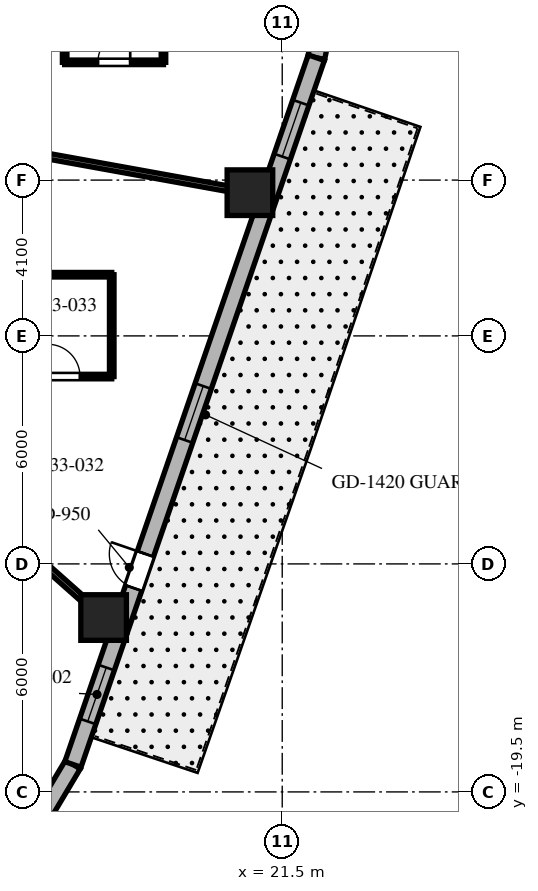
"""IFC4 building model, lengths in metres.
Left out: names, types, materials, properties, quantities, classifications, styles, units other than length and angle.
Written with IfcOpenShell. Run it as: python <this file> out.ifc"""

import sys

from ifc_helpers import new_model, si_unit, direction, frame, frame_2d, origin, origin_2d, place, context, subcontext, project, spatial, rectangle, extrude, element, fill, save


model = new_model("IFC4")
c1 = context("Model", 3, precision=1e-05, world=origin(), true_north=direction((0.0, 1.0)))
c2 = subcontext(c1, "Body", "Model", "MODEL_VIEW")
j1 = project(units=[si_unit("LENGTHUNIT", "METRE"), si_unit("PLANEANGLEUNIT", "RADIAN")], contexts=[c1])
p1 = place(None, origin())
s1 = spatial("IfcSite", under=j1, at=p1, CompositionType="ELEMENT")
p2 = place(p1, origin())
s2 = spatial("IfcBuilding", under=s1, at=p2, CompositionType="ELEMENT")
p3 = place(p2, frame((0.0, 0.0, 135.8)))
s3 = spatial("IfcBuildingStorey", under=s2, at=p3, CompositionType="ELEMENT", Elevation=135.8)
for number, where, z_axis, x_axis in (
    (1, (16.8, -14.911, 0.0), (0.0, 0.0, 1.0), (1.0, 0.0, 0.0)),
    (2, (20.65, -3.731, 0.0), (0.0, 0.0, 1.0), (1.0, 0.0, 0.0)),
):
    element("IfcColumn", number, at=place(p3, frame(where, z_axis=z_axis, x_axis=x_axis)), inside=s3, PredefinedType="COLUMN", context=c2, shape_type="SweptSolid", body=[
        extrude(rectangle(XDim=1.2, YDim=1.2, at=origin_2d()), origin(), (0.0, 0.0, 1.0), 3.7),
    ])
p4 = place(p3, frame((15.272, -19.984, 0.0), z_axis=(0.0, 0.0, 1.0), x_axis=(0.512579347361, 0.858639862025, 0.0)))
e3 = element("IfcWall", 3, at=p4, inside=s3, PredefinedType="SOLIDWALL", context=c2, shape_type="SweptSolid", body=[
    extrude(rectangle(XDim=1.406, YDim=0.45, at=frame_2d((0.703, 0.0))), origin(), (0.0, 0.0, 1.0), 3.38),
])
p5 = place(p3, frame((22.397, -0.179, 0.0), z_axis=(0.0, 0.0, 1.0), x_axis=(0.199313589404, 0.979935759669, 0.0)))
e4 = element("IfcWall", 4, at=p5, inside=s3, PredefinedType="SOLIDWALL", context=c2, shape_type="SweptSolid", body=[
    extrude(rectangle(XDim=0.896, YDim=0.45, at=frame_2d((0.448, 0.0))), origin(), (0.0, 0.0, 1.0), 3.38),
])
p6 = place(p3, frame((15.992, -18.777, 0.0), z_axis=(0.0, 0.0, 1.0), x_axis=(0.325606988926, 0.945505202927, 0.0)))
e5 = element("IfcWall", 5, at=p6, inside=s3, PredefinedType="SOLIDWALL", context=c2, shape_type="SweptSolid", body=[
    extrude(rectangle(XDim=19.669, YDim=0.45, at=frame_2d((9.835, 0.0))), origin(), (0.0, 0.0, 1.0), 3.38),
])
p7 = place(p6, frame((4.909, 0.0, 0.0)))
e6 = element("IfcOpeningElement", 6, at=p7, cuts=e5, PredefinedType="OPENING", context=c2, shape_type="SweptSolid", body=[
    extrude(rectangle(XDim=0.95, YDim=2.15, at=frame_2d((0.475, 1.075))), frame((0.0, 0.235, 0.0), z_axis=(0.0, -1.0, 0.0), x_axis=(1.0, 0.0, 0.0)), (0.0, 0.0, 1.0), 0.47),
])
p8 = place(p6, frame((1.197, 0.0, 0.8)))
e7 = element("IfcOpeningElement", 7, at=p8, cuts=e5, PredefinedType="OPENING", context=c2, shape_type="SweptSolid", body=[
    extrude(rectangle(XDim=1.5, YDim=1.8, at=frame_2d((0.75, 0.9))), frame((0.0, 0.235, 0.0), z_axis=(0.0, -1.0, 0.0), x_axis=(1.0, 0.0, 0.0)), (0.0, 0.0, 1.0), 0.47),
])
p9 = place(p6, frame((9.03, 0.0, 0.8)))
e8 = element("IfcOpeningElement", 8, at=p9, cuts=e5, PredefinedType="OPENING", context=c2, shape_type="SweptSolid", body=[
    extrude(rectangle(XDim=1.5, YDim=1.8, at=frame_2d((0.75, 0.9))), frame((0.0, 0.235, 0.0), z_axis=(0.0, -1.0, 0.0), x_axis=(1.0, 0.0, 0.0)), (0.0, 0.0, 1.0), 0.47),
])
p10 = place(p6, frame((16.918, 0.0, 0.8)))
e9 = element("IfcOpeningElement", 9, at=p10, cuts=e5, PredefinedType="OPENING", context=c2, shape_type="SweptSolid", body=[
    extrude(rectangle(XDim=1.5, YDim=1.8, at=frame_2d((0.75, 0.9))), frame((0.0, 0.235, 0.0), z_axis=(0.0, -1.0, 0.0), x_axis=(1.0, 0.0, 0.0)), (0.0, 0.0, 1.0), 0.47),
])
p11 = place(p3, frame((11.098, -9.85, 0.0), z_axis=(0.0, 0.0, 1.0), x_axis=(0.747904295103, -0.663806572253, 0.0)))
e10 = element("IfcWall", 10, at=p11, inside=s3, PredefinedType="PARTITIONING", context=c2, shape_type="SweptSolid", body=[
    extrude(rectangle(XDim=8.16, YDim=0.15, at=frame_2d((4.08, 0.0))), origin(), (0.0, 0.0, 1.0), 2.52),
])
p12 = place(p3, frame((11.35, -2.051, 0.0), z_axis=(0.0, 0.0, 1.0), x_axis=(0.984068313063, -0.177790762484, 0.0)))
e11 = element("IfcWall", 11, at=p12, inside=s3, PredefinedType="PARTITIONING", context=c2, shape_type="SweptSolid", body=[
    extrude(rectangle(XDim=9.951, YDim=0.15, at=frame_2d((4.976, 0.0))), origin(), (0.0, 0.0, 1.0), 2.52),
])
p13 = place(p3, frame((14.494, -8.57, 0.0), z_axis=(0.0, 0.0, 1.0), x_axis=(1.0, 0.0, 0.0)))
e12 = element("IfcWall", 12, at=p13, inside=s3, PredefinedType="PARTITIONING", context=c2, shape_type="SweptSolid", body=[
    extrude(rectangle(XDim=2.52, YDim=0.12, at=frame_2d((1.26, 0.0))), origin(), (0.0, 0.0, 1.0), 2.952),
])
p14 = place(p13, frame((0.835, 0.0, 0.0)))
e13 = element("IfcOpeningElement", 13, at=p14, cuts=e12, PredefinedType="OPENING", context=c2, shape_type="SweptSolid", body=[
    extrude(rectangle(XDim=0.85, YDim=2.03, at=frame_2d((0.425, 1.015))), frame((0.0, 0.07, 0.0), z_axis=(0.0, -1.0, 0.0), x_axis=(1.0, 0.0, 0.0)), (0.0, 0.0, 1.0), 0.14),
])
p15 = place(p3, frame((17.014, -8.57, 0.0), z_axis=(0.0, 0.0, 1.0), x_axis=(0.0, 1.0, 0.0)))
e14 = element("IfcWall", 14, at=p15, inside=s3, PredefinedType="PARTITIONING", context=c2, shape_type="SweptSolid", body=[
    extrude(rectangle(XDim=2.68, YDim=0.12, at=frame_2d((1.34, 0.0))), origin(), (0.0, 0.0, 1.0), 3.38),
])
p16 = place(p3, frame((17.014, -5.89, 0.0), z_axis=(0.0, 0.0, 1.0), x_axis=(-1.0, 0.0, 0.0)))
e15 = element("IfcWall", 15, at=p16, inside=s3, PredefinedType="PARTITIONING", context=c2, shape_type="SweptSolid", body=[
    extrude(rectangle(XDim=2.52, YDim=0.12, at=frame_2d((1.26, 0.0))), origin(), (0.0, 0.0, 1.0), 2.82),
])
p17 = place(p3, frame((15.775, -0.301, 0.0), z_axis=(0.0, 0.0, 1.0), x_axis=(1.0, 0.0, 0.0)))
e16 = element("IfcWall", 16, at=p17, inside=s3, PredefinedType="PARTITIONING", context=c2, shape_type="SweptSolid", body=[
    extrude(rectangle(XDim=2.6, YDim=0.12, at=frame_2d((1.3, 0.0))), origin(), (0.0, 0.0, 1.0), 2.821),
])
p18 = place(p17, frame((0.875, 0.0, 0.0)))
e17 = element("IfcOpeningElement", 17, at=p18, cuts=e16, PredefinedType="OPENING", context=c2, shape_type="SweptSolid", body=[
    extrude(rectangle(XDim=0.85, YDim=2.03, at=frame_2d((0.425, 1.015))), frame((0.0, 0.07, 0.0), z_axis=(0.0, -1.0, 0.0), x_axis=(1.0, 0.0, 0.0)), (0.0, 0.0, 1.0), 0.14),
])
for number, where, z_axis, x_axis in (
    (18, (18.375, -0.301, 0.0), (0.0, 0.0, 1.0), (0.0, 1.0, 0.0)),
    (19, (15.775, 2.449, 0.0), (0.0, 0.0, 1.0), (0.0, -1.0, 0.0)),
):
    element("IfcWall", number, at=place(p3, frame(where, z_axis=z_axis, x_axis=x_axis)), inside=s3, PredefinedType="PARTITIONING", context=c2, shape_type="SweptSolid", body=[
        extrude(rectangle(XDim=2.75, YDim=0.12, at=frame_2d((1.375, 0.0))), origin(), (0.0, 0.0, 1.0), 3.38),
    ])
p19 = place(p7, origin())
e20 = element("IfcDoor", 20, at=p19, inside=s3, OperationType="SINGLE_SWING_RIGHT", PredefinedType="DOOR", context=c2, shape_type="SweptSolid", body=[
    extrude(rectangle(XDim=0.95, YDim=2.15, at=frame_2d((0.475, 1.075))), frame((0.0, 0.025, 0.0), z_axis=(0.0, -1.0, 0.0), x_axis=(1.0, 0.0, 0.0)), (0.0, 0.0, 1.0), 0.05),
])
fill(e6, e20)
p20 = place(p8, origin())
e21 = element("IfcWindow", 21, at=p20, inside=s3, PartitioningType="SINGLE_PANEL", PredefinedType="WINDOW", context=c2, shape_type="SweptSolid", body=[
    extrude(rectangle(XDim=1.5, YDim=1.8, at=frame_2d((0.75, 0.9))), frame((0.0, 0.03, 0.0), z_axis=(0.0, -1.0, 0.0), x_axis=(1.0, 0.0, 0.0)), (0.0, 0.0, 1.0), 0.06),
])
fill(e7, e21)
p21 = place(p9, origin())
e22 = element("IfcWindow", 22, at=p21, inside=s3, PartitioningType="SINGLE_PANEL", PredefinedType="WINDOW", context=c2, shape_type="SweptSolid", body=[
    extrude(rectangle(XDim=1.5, YDim=1.8, at=frame_2d((0.75, 0.9))), frame((0.0, 0.03, 0.0), z_axis=(0.0, -1.0, 0.0), x_axis=(1.0, 0.0, 0.0)), (0.0, 0.0, 1.0), 0.06),
])
fill(e8, e22)
p22 = place(p10, origin())
e23 = element("IfcWindow", 23, at=p22, inside=s3, PartitioningType="SINGLE_PANEL", PredefinedType="WINDOW", context=c2, shape_type="SweptSolid", body=[
    extrude(rectangle(XDim=1.5, YDim=1.8, at=frame_2d((0.75, 0.9))), frame((0.0, 0.03, 0.0), z_axis=(0.0, -1.0, 0.0), x_axis=(1.0, 0.0, 0.0)), (0.0, 0.0, 1.0), 0.06),
])
fill(e9, e23)
p23 = place(p14, origin())
e24 = element("IfcDoor", 24, at=p23, inside=s3, OperationType="SINGLE_SWING_LEFT", PredefinedType="DOOR", context=c2, shape_type="SweptSolid", body=[
    extrude(rectangle(XDim=0.85, YDim=2.03, at=frame_2d((0.425, 1.015))), frame((0.0, 0.025, 0.0), z_axis=(0.0, -1.0, 0.0), x_axis=(1.0, 0.0, 0.0)), (0.0, 0.0, 1.0), 0.05),
])
fill(e13, e24)
p24 = place(p18, origin())
e25 = element("IfcDoor", 25, at=p24, inside=s3, OperationType="SINGLE_SWING_RIGHT", PredefinedType="DOOR", context=c2, shape_type="SweptSolid", body=[
    extrude(rectangle(XDim=0.85, YDim=2.03, at=frame_2d((0.425, 1.015))), frame((0.0, 0.025, 0.0), z_axis=(0.0, -1.0, 0.0), x_axis=(1.0, 0.0, 0.0)), (0.0, 0.0, 1.0), 0.05),
])
fill(e17, e25)
save(model, sys.argv[1])
